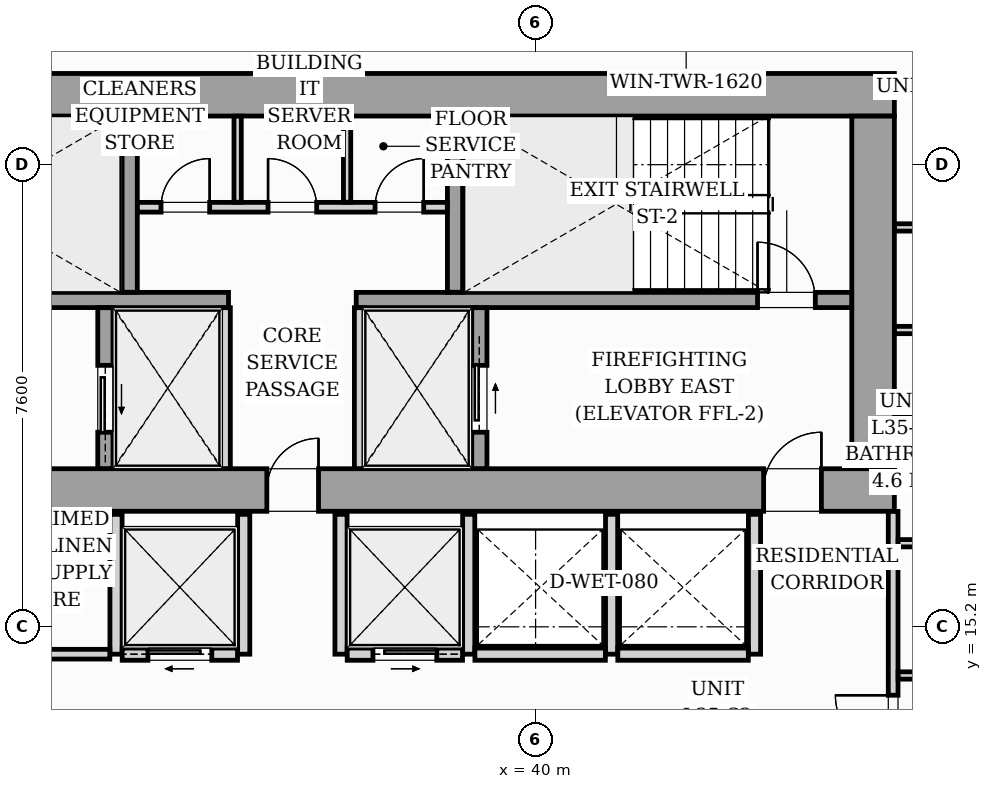
"""IFC4 building model, lengths in metres.
Left out: names, types, materials, properties, quantities, classifications, styles, units other than length and angle.
Written with IfcOpenShell. Run it as: python <this file> out.ifc"""

import sys

from ifc_helpers import new_model, si_unit, direction, frame, frame_2d, origin, origin_2d, place, context, subcontext, project, spatial, rectangle, i_section, extrude, source, transform, mapped, element, fill, save


model = new_model("IFC4")
c1 = context("Model", 3, precision=1e-05, world=origin(), true_north=direction((0.0, 1.0)))
c2 = subcontext(c1, "Body", "Model", "MODEL_VIEW")
j1 = project(units=[si_unit("LENGTHUNIT", "METRE"), si_unit("PLANEANGLEUNIT", "RADIAN")], contexts=[c1])
p1 = place(None, origin())
s1 = spatial("IfcSite", under=j1, at=p1, CompositionType="ELEMENT")
p2 = place(p1, origin())
s2 = spatial("IfcBuilding", under=s1, at=p2, CompositionType="ELEMENT")
p3 = place(p2, frame((0.0, 0.0, 124.6)))
s3 = spatial("IfcBuildingStorey", under=s2, at=p3, CompositionType="ELEMENT", Elevation=124.6)
m1 = source(origin(), c2, "Body", "SweptSolid", [
    extrude(i_section(OverallWidth=0.421, OverallDepth=0.465, WebThickness=0.045, FlangeThickness=0.073, FilletRadius=0.018, at=origin_2d()), origin(), (0.0, 0.0, 1.0), 3.196),
])
for number, where, z_axis, x_axis in (
    (1, (33.12, 17.4, 0.002), (0.0, 0.0, 1.0), (1.0, 0.0, 0.0)),
    (2, (38.88, 17.4, 0.002), (0.0, 0.0, 1.0), (1.0, 0.0, 0.0)),
    (3, (45.6, 17.4, 0.002), (0.0, 0.0, 1.0), (1.0, 0.0, 0.0)),
    (4, (33.12, 24.0, 0.002), (0.0, 0.0, 1.0), (1.0, 0.0, 0.0)),
    (5, (38.88, 24.0, 0.002), (0.0, 0.0, 1.0), (1.0, 0.0, 0.0)),
    (6, (45.6, 24.0, 0.002), (0.0, 0.0, 1.0), (1.0, 0.0, 0.0)),
):
    element("IfcColumn", number, at=place(p3, frame(where, z_axis=z_axis, x_axis=x_axis)), inside=s3, PredefinedType="PILASTER", context=c2, shape_type="MappedRepresentation", body=[
        mapped(m1, transform((0.0, 0.0, 0.0), scale=1.0)),
    ])
p4 = place(p3, frame((40.983, 25.727, 0.0), z_axis=(0.0, 0.0, 1.0), x_axis=(0.995395844771, -0.095849424686, 0.0)))
e7 = element("IfcWall", 7, at=p4, inside=s3, PredefinedType="STANDARD", context=c2, shape_type="SweptSolid", body=[
    extrude(rectangle(XDim=17.01, YDim=0.26, at=frame_2d((8.505, 0.0))), origin(), (0.0, 0.0, 1.0), 2.94),
])
p5 = place(p4, frame((11.06, 0.0, 0.0)))
e8 = element("IfcOpeningElement", 8, at=p5, cuts=e7, PredefinedType="OPENING", context=c2, shape_type="SweptSolid", body=[
    extrude(rectangle(XDim=1.8, YDim=2.06, at=frame_2d((0.9, 1.03))), frame((0.0, 0.14, 0.0), z_axis=(0.0, -1.0, 0.0), x_axis=(1.0, 0.0, 0.0)), (0.0, 0.0, 1.0), 0.28),
])
p6 = place(p4, frame((0.7, 0.0, 0.65)))
e9 = element("IfcOpeningElement", 9, at=p6, cuts=e7, PredefinedType="OPENING", context=c2, shape_type="SweptSolid", body=[
    extrude(rectangle(XDim=1.6, YDim=1.5, at=frame_2d((0.8, 0.75))), frame((0.0, 0.14, 0.0), z_axis=(0.0, -1.0, 0.0), x_axis=(1.0, 0.0, 0.0)), (0.0, 0.0, 1.0), 0.28),
])
p7 = place(p3, frame((26.1, 17.45, 0.0), z_axis=(0.0, 0.0, 1.0), x_axis=(1.0, 0.0, 0.0)))
e10 = element("IfcWall", 10, at=p7, inside=s3, PredefinedType="SHEAR", context=c2, shape_type="SweptSolid", body=[
    extrude(rectangle(XDim=19.8, YDim=0.7, at=frame_2d((9.9, 0.0))), origin(), (0.0, 0.0, 1.0), 3.2),
])
p8 = place(p7, frame((1.05, 0.0, 0.0)))
e11 = element("IfcOpeningElement", 11, at=p8, cuts=e10, PredefinedType="OPENING", context=c2, shape_type="SweptSolid", body=[
    extrude(rectangle(XDim=0.95, YDim=2.06, at=frame_2d((0.475, 1.03))), frame((0.0, 0.36, 0.0), z_axis=(0.0, -1.0, 0.0), x_axis=(1.0, 0.0, 0.0)), (0.0, 0.0, 1.0), 0.72),
])
p9 = place(p7, frame((9.48, 0.0, 0.0)))
e12 = element("IfcOpeningElement", 12, at=p9, cuts=e10, PredefinedType="OPENING", context=c2, shape_type="SweptSolid", body=[
    extrude(rectangle(XDim=0.85, YDim=2.0, at=frame_2d((0.425, 1.0))), frame((0.0, 0.36, 0.0), z_axis=(0.0, -1.0, 0.0), x_axis=(1.0, 0.0, 0.0)), (0.0, 0.0, 1.0), 0.72),
])
p10 = place(p7, frame((17.65, 0.0, 0.0)))
e13 = element("IfcOpeningElement", 13, at=p10, cuts=e10, PredefinedType="OPENING", context=c2, shape_type="SweptSolid", body=[
    extrude(rectangle(XDim=0.95, YDim=2.06, at=frame_2d((0.475, 1.03))), frame((0.0, 0.36, 0.0), z_axis=(0.0, -1.0, 0.0), x_axis=(1.0, 0.0, 0.0)), (0.0, 0.0, 1.0), 0.72),
])
p11 = place(p3, frame((26.1, 23.95, 0.0), z_axis=(0.0, 0.0, 1.0), x_axis=(1.0, 0.0, 0.0)))
e14 = element("IfcWall", 14, at=p11, inside=s3, PredefinedType="SHEAR", context=c2, shape_type="SweptSolid", body=[
    extrude(rectangle(XDim=19.8, YDim=0.7, at=frame_2d((9.9, 0.0))), origin(), (0.0, 0.0, 1.0), 3.2),
])
p12 = place(p3, frame((45.55, 17.802, 0.0), z_axis=(0.0, 0.0, 1.0), x_axis=(0.0, 1.0, 0.0)))
e15 = element("IfcWall", 15, at=p12, inside=s3, PredefinedType="SHEAR", context=c2, shape_type="SweptSolid", body=[
    extrude(rectangle(XDim=5.796, YDim=0.7, at=frame_2d((2.898, 0.0))), origin(), (0.0, 0.0, 1.0), 3.2),
])
p13 = place(p3, frame((26.802, 20.575, 0.0), z_axis=(0.0, 0.0, 1.0), x_axis=(1.0, 0.0, 0.0)))
e16 = element("IfcWall", 16, at=p13, inside=s3, PredefinedType="SOLIDWALL", context=c2, shape_type="SweptSolid", body=[
    extrude(rectangle(XDim=8.148, YDim=0.25, at=frame_2d((4.074, 0.0))), origin(), (0.0, 0.0, 1.0), 3.2),
])
p14 = place(p13, frame((0.348, 0.0, 0.0)))
e17 = element("IfcOpeningElement", 17, at=p14, cuts=e16, PredefinedType="OPENING", context=c2, shape_type="SweptSolid", body=[
    extrude(rectangle(XDim=0.95, YDim=2.06, at=frame_2d((0.475, 1.03))), frame((0.0, 0.135, 0.0), z_axis=(0.0, -1.0, 0.0), x_axis=(1.0, 0.0, 0.0)), (0.0, 0.0, 1.0), 0.27),
])
p15 = place(p3, frame((37.05, 20.575, 0.0), z_axis=(0.0, 0.0, 1.0), x_axis=(1.0, 0.0, 0.0)))
e18 = element("IfcWall", 18, at=p15, inside=s3, PredefinedType="SOLIDWALL", context=c2, shape_type="SweptSolid", body=[
    extrude(rectangle(XDim=8.148, YDim=0.25, at=frame_2d((4.074, 0.0))), origin(), (0.0, 0.0, 1.0), 3.2),
])
p16 = place(p15, frame((6.6, 0.0, 0.0)))
e19 = element("IfcOpeningElement", 19, at=p16, cuts=e18, PredefinedType="OPENING", context=c2, shape_type="SweptSolid", body=[
    extrude(rectangle(XDim=0.95, YDim=2.06, at=frame_2d((0.475, 1.03))), frame((0.0, 0.135, 0.0), z_axis=(0.0, -1.0, 0.0), x_axis=(1.0, 0.0, 0.0)), (0.0, 0.0, 1.0), 0.27),
])
for number, where, z_axis, x_axis in (
    (20, (33.325, 20.702, 0.0), (0.0, 0.0, 1.0), (0.0, 1.0, 0.0)),
    (21, (38.675, 20.702, 0.0), (0.0, 0.0, 1.0), (0.0, 1.0, 0.0)),
):
    element("IfcWall", number, at=place(p3, frame(where, z_axis=z_axis, x_axis=x_axis)), inside=s3, PredefinedType="SOLIDWALL", context=c2, shape_type="SweptSolid", body=[
        extrude(rectangle(XDim=2.896, YDim=0.25, at=frame_2d((1.448, 0.0))), origin(), (0.0, 0.0, 1.0), 3.2),
    ])
p17 = place(p3, frame((32.925, 17.802, 0.0), z_axis=(0.0, 0.0, 1.0), x_axis=(0.0, 1.0, 0.0)))
e22 = element("IfcWall", 22, at=p17, inside=s3, PredefinedType="SOLIDWALL", context=c2, shape_type="SweptSolid", body=[
    extrude(rectangle(XDim=2.646, YDim=0.25, at=frame_2d((1.323, 0.0))), origin(), (0.0, 0.0, 1.0), 3.2),
])
p18 = place(p17, frame((0.598, 0.0, 0.0)))
e23 = element("IfcOpeningElement", 23, at=p18, cuts=e22, PredefinedType="OPENING", context=c2, shape_type="SweptSolid", body=[
    extrude(rectangle(XDim=1.1, YDim=2.08, at=frame_2d((0.55, 1.04))), frame((0.0, 0.135, 0.0), z_axis=(0.0, -1.0, 0.0), x_axis=(1.0, 0.0, 0.0)), (0.0, 0.0, 1.0), 0.27),
])
for number, where, z_axis, x_axis in (
    (24, (34.9, 17.802, 0.0), (0.0, 0.0, 1.0), (0.0, 1.0, 0.0)),
    (25, (37.1, 17.802, 0.0), (0.0, 0.0, 1.0), (0.0, 1.0, 0.0)),
):
    element("IfcWall", number, at=place(p3, frame(where, z_axis=z_axis, x_axis=x_axis)), inside=s3, PredefinedType="PARTITIONING", context=c2, shape_type="SweptSolid", body=[
        extrude(rectangle(XDim=2.646, YDim=0.16, at=frame_2d((1.323, 0.0))), origin(), (0.0, 0.0, 1.0), 2.94),
    ])
p19 = place(p3, frame((39.075, 17.802, 0.0), z_axis=(0.0, 0.0, 1.0), x_axis=(0.0, 1.0, 0.0)))
e26 = element("IfcWall", 26, at=p19, inside=s3, PredefinedType="SOLIDWALL", context=c2, shape_type="SweptSolid", body=[
    extrude(rectangle(XDim=2.646, YDim=0.25, at=frame_2d((1.323, 0.0))), origin(), (0.0, 0.0, 1.0), 3.2),
])
p20 = place(p19, frame((0.598, 0.0, 0.0)))
e27 = element("IfcOpeningElement", 27, at=p20, cuts=e26, PredefinedType="OPENING", context=c2, shape_type="SweptSolid", body=[
    extrude(rectangle(XDim=1.1, YDim=2.08, at=frame_2d((0.55, 1.04))), frame((0.0, 0.135, 0.0), z_axis=(0.0, -1.0, 0.0), x_axis=(1.0, 0.0, 0.0)), (0.0, 0.0, 1.0), 0.27),
])
p21 = place(p3, frame((33.452, 22.1, 0.0), z_axis=(0.0, 0.0, 1.0), x_axis=(1.0, 0.0, 0.0)))
e28 = element("IfcWall", 28, at=p21, inside=s3, PredefinedType="PARTITIONING", context=c2, shape_type="SweptSolid", body=[
    extrude(rectangle(XDim=5.096, YDim=0.16, at=frame_2d((2.548, 0.0))), origin(), (0.0, 0.0, 1.0), 2.94),
])
p22 = place(p21, frame((0.388, 0.0, 0.0)))
e29 = element("IfcOpeningElement", 29, at=p22, cuts=e28, PredefinedType="OPENING", context=c2, shape_type="SweptSolid", body=[
    extrude(rectangle(XDim=0.8, YDim=2.05, at=frame_2d((0.4, 1.025))), frame((0.0, 0.09, 0.0), z_axis=(0.0, -1.0, 0.0), x_axis=(1.0, 0.0, 0.0)), (0.0, 0.0, 1.0), 0.18),
])
p23 = place(p21, frame((2.148, 0.0, 0.0)))
e30 = element("IfcOpeningElement", 30, at=p23, cuts=e28, PredefinedType="OPENING", context=c2, shape_type="SweptSolid", body=[
    extrude(rectangle(XDim=0.8, YDim=2.05, at=frame_2d((0.4, 1.025))), frame((0.0, 0.09, 0.0), z_axis=(0.0, -1.0, 0.0), x_axis=(1.0, 0.0, 0.0)), (0.0, 0.0, 1.0), 0.18),
])
p24 = place(p21, frame((3.908, 0.0, 0.0)))
e31 = element("IfcOpeningElement", 31, at=p24, cuts=e28, PredefinedType="OPENING", context=c2, shape_type="SweptSolid", body=[
    extrude(rectangle(XDim=0.8, YDim=2.05, at=frame_2d((0.4, 1.025))), frame((0.0, 0.09, 0.0), z_axis=(0.0, -1.0, 0.0), x_axis=(1.0, 0.0, 0.0)), (0.0, 0.0, 1.0), 0.18),
])
for number, where, z_axis, x_axis in (
    (32, (35.1, 22.182, 0.0), (0.0, 0.0, 1.0), (0.0, 1.0, 0.0)),
    (33, (36.9, 22.182, 0.0), (0.0, 0.0, 1.0), (0.0, 1.0, 0.0)),
):
    element("IfcWall", number, at=place(p3, frame(where, z_axis=z_axis, x_axis=x_axis)), inside=s3, PredefinedType="PARTITIONING", context=c2, shape_type="SweptSolid", body=[
        extrude(rectangle(XDim=1.416, YDim=0.12, at=frame_2d((0.708, 0.0))), origin(), (0.0, 0.0, 1.0), 2.94),
    ])
p25 = place(p3, frame((33.1, 14.75, 0.0), z_axis=(0.0, 0.0, 1.0), x_axis=(0.0, 1.0, 0.0)))
e34 = element("IfcWall", 34, at=p25, inside=s3, PredefinedType="PARTITIONING", context=c2, shape_type="SweptSolid", body=[
    extrude(rectangle(XDim=2.3, YDim=0.2, at=frame_2d((1.15, 0.0))), origin(), (0.0, 0.0, 1.0), 2.94),
])
p26 = place(p3, frame((28.482, 14.75, 0.0), z_axis=(0.0, 0.0, 1.0), x_axis=(1.0, 0.0, 0.0)))
e35 = element("IfcWall", 35, at=p26, inside=s3, PredefinedType="PARTITIONING", context=c2, shape_type="SweptSolid", body=[
    extrude(rectangle(XDim=4.516, YDim=0.16, at=frame_2d((2.258, 0.0))), origin(), (0.0, 0.0, 1.0), 2.94),
])
p27 = place(p26, frame((1.868, 0.0, 0.0)))
e36 = element("IfcOpeningElement", 36, at=p27, cuts=e35, PredefinedType="OPENING", context=c2, shape_type="SweptSolid", body=[
    extrude(rectangle(XDim=0.8, YDim=2.05, at=frame_2d((0.4, 1.025))), frame((0.0, 0.09, 0.0), z_axis=(0.0, -1.0, 0.0), x_axis=(1.0, 0.0, 0.0)), (0.0, 0.0, 1.0), 0.18),
])
p28 = place(p3, frame((35.2, 14.75, 0.0), z_axis=(0.0, 0.0, 1.0), x_axis=(0.0, 1.0, 0.0)))
e37 = element("IfcWall", 37, at=p28, inside=s3, PredefinedType="PARTITIONING", context=c2, shape_type="SweptSolid", body=[
    extrude(rectangle(XDim=2.3, YDim=0.2, at=frame_2d((1.15, 0.0))), origin(), (0.0, 0.0, 1.0), 2.94),
])
p29 = place(p3, frame((33.202, 14.75, 0.0), z_axis=(0.0, 0.0, 1.0), x_axis=(1.0, 0.0, 0.0)))
e38 = element("IfcWall", 38, at=p29, inside=s3, PredefinedType="PARTITIONING", context=c2, shape_type="SweptSolid", body=[
    extrude(rectangle(XDim=1.896, YDim=0.2, at=frame_2d((0.948, 0.0))), origin(), (0.0, 0.0, 1.0), 2.94),
])
p30 = place(p29, frame((0.423, 0.0, 0.0)))
e39 = element("IfcOpeningElement", 39, at=p30, cuts=e38, PredefinedType="OPENING", context=c2, shape_type="SweptSolid", body=[
    extrude(rectangle(XDim=1.05, YDim=2.08, at=frame_2d((0.525, 1.04))), frame((0.0, 0.11, 0.0), z_axis=(0.0, -1.0, 0.0), x_axis=(1.0, 0.0, 0.0)), (0.0, 0.0, 1.0), 0.22),
])
for number, where, z_axis, x_axis in (
    (40, (36.8, 14.75, 0.0), (0.0, 0.0, 1.0), (0.0, 1.0, 0.0)),
    (41, (38.9, 14.75, 0.0), (0.0, 0.0, 1.0), (0.0, 1.0, 0.0)),
):
    element("IfcWall", number, at=place(p3, frame(where, z_axis=z_axis, x_axis=x_axis)), inside=s3, PredefinedType="PARTITIONING", context=c2, shape_type="SweptSolid", body=[
        extrude(rectangle(XDim=2.3, YDim=0.2, at=frame_2d((1.15, 0.0))), origin(), (0.0, 0.0, 1.0), 2.94),
    ])
p31 = place(p3, frame((36.902, 14.75, 0.0), z_axis=(0.0, 0.0, 1.0), x_axis=(1.0, 0.0, 0.0)))
e42 = element("IfcWall", 42, at=p31, inside=s3, PredefinedType="PARTITIONING", context=c2, shape_type="SweptSolid", body=[
    extrude(rectangle(XDim=1.896, YDim=0.2, at=frame_2d((0.948, 0.0))), origin(), (0.0, 0.0, 1.0), 2.94),
])
p32 = place(p31, frame((0.423, 0.0, 0.0)))
e43 = element("IfcOpeningElement", 43, at=p32, cuts=e42, PredefinedType="OPENING", context=c2, shape_type="SweptSolid", body=[
    extrude(rectangle(XDim=1.05, YDim=2.08, at=frame_2d((0.525, 1.04))), frame((0.0, 0.11, 0.0), z_axis=(0.0, -1.0, 0.0), x_axis=(1.0, 0.0, 0.0)), (0.0, 0.0, 1.0), 0.22),
])
for number, where, z_axis, x_axis in (
    (44, (41.25, 14.75, 0.0), (0.0, 0.0, 1.0), (0.0, 1.0, 0.0)),
    (45, (43.6, 14.75, 0.0), (0.0, 0.0, 1.0), (0.0, 1.0, 0.0)),
):
    element("IfcWall", number, at=place(p3, frame(where, z_axis=z_axis, x_axis=x_axis)), inside=s3, PredefinedType="PARTITIONING", context=c2, shape_type="SweptSolid", body=[
        extrude(rectangle(XDim=2.3, YDim=0.2, at=frame_2d((1.15, 0.0))), origin(), (0.0, 0.0, 1.0), 2.94),
    ])
for number, where, z_axis, x_axis in (
    (46, (39.002, 14.75, 0.0), (0.0, 0.0, 1.0), (1.0, 0.0, 0.0)),
    (47, (41.352, 14.75, 0.0), (0.0, 0.0, 1.0), (1.0, 0.0, 0.0)),
):
    element("IfcWall", number, at=place(p3, frame(where, z_axis=z_axis, x_axis=x_axis)), inside=s3, PredefinedType="PARTITIONING", context=c2, shape_type="SweptSolid", body=[
        extrude(rectangle(XDim=2.146, YDim=0.2, at=frame_2d((1.073, 0.0))), origin(), (0.0, 0.0, 1.0), 2.94),
    ])
p33 = place(p3, frame((45.88, 12.632, 0.0), z_axis=(0.0, 0.0, 1.0), x_axis=(0.0, 1.0, 0.0)))
e48 = element("IfcWall", 48, at=p33, inside=s3, PredefinedType="PARTITIONING", context=c2, shape_type="SweptSolid", body=[
    extrude(rectangle(XDim=4.466, YDim=0.16, at=frame_2d((2.233, 0.0))), origin(), (0.0, 0.0, 1.0), 2.94),
])
p34 = place(p33, frame((0.493, 0.0, 0.0)))
e49 = element("IfcOpeningElement", 49, at=p34, cuts=e48, PredefinedType="OPENING", context=c2, shape_type="SweptSolid", body=[
    extrude(rectangle(XDim=0.95, YDim=2.06, at=frame_2d((0.475, 1.03))), frame((0.0, 0.09, 0.0), z_axis=(0.0, -1.0, 0.0), x_axis=(1.0, 0.0, 0.0)), (0.0, 0.0, 1.0), 0.18),
])
for number, where, z_axis, x_axis in (
    (50, (45.962, 16.575, 0.0), (0.0, 0.0, 1.0), (1.0, 0.0, 0.0)),
    (51, (45.962, 14.4, 0.0), (0.0, 0.0, 1.0), (1.0, 0.0, 0.0)),
):
    element("IfcWall", number, at=place(p3, frame(where, z_axis=z_axis, x_axis=x_axis)), inside=s3, PredefinedType="PARTITIONING", context=c2, shape_type="SweptSolid", body=[
        extrude(rectangle(XDim=2.256, YDim=0.12, at=frame_2d((1.128, 0.0))), origin(), (0.0, 0.0, 1.0), 2.94),
    ])
p35 = place(p3, frame((45.902, 18.75, 0.0), z_axis=(0.0, 0.0, 1.0), x_axis=(1.0, 0.0, 0.0)))
e52 = element("IfcWall", 52, at=p35, inside=s3, PredefinedType="PARTITIONING", context=c2, shape_type="SweptSolid", body=[
    extrude(rectangle(XDim=2.316, YDim=0.12, at=frame_2d((1.158, 0.0))), origin(), (0.0, 0.0, 1.0), 2.94),
])
p36 = place(p3, frame((45.902, 21.768, 0.0), z_axis=(0.0, 0.0, 1.0), x_axis=(1.0, 0.0, 0.0)))
e53 = element("IfcWall", 53, at=p36, inside=s3, PredefinedType="PARTITIONING", context=c2, shape_type="SweptSolid", body=[
    extrude(rectangle(XDim=12.781, YDim=0.12, at=frame_2d((6.391, 0.0))), origin(), (0.0, 0.0, 1.0), 2.94),
])
p37 = place(p36, frame((6.146, 0.0, 0.0)))
e54 = element("IfcOpeningElement", 54, at=p37, cuts=e53, PredefinedType="OPENING", context=c2, shape_type="SweptSolid", body=[
    extrude(rectangle(XDim=0.85, YDim=2.05, at=frame_2d((0.425, 1.025))), frame((0.0, 0.07, 0.0), z_axis=(0.0, -1.0, 0.0), x_axis=(1.0, 0.0, 0.0)), (0.0, 0.0, 1.0), 0.14),
])
p38 = place(p3, frame((45.902, 20.081, 0.0), z_axis=(0.0, 0.0, 1.0), x_axis=(1.0, 0.0, 0.0)))
e55 = element("IfcWall", 55, at=p38, inside=s3, PredefinedType="PARTITIONING", context=c2, shape_type="SweptSolid", body=[
    extrude(rectangle(XDim=14.057, YDim=0.12, at=frame_2d((7.029, 0.0))), origin(), (0.0, 0.0, 1.0), 2.94),
])
p39 = place(p38, frame((6.708, 0.0, 0.0)))
e56 = element("IfcOpeningElement", 56, at=p39, cuts=e55, PredefinedType="OPENING", context=c2, shape_type="SweptSolid", body=[
    extrude(rectangle(XDim=0.85, YDim=2.05, at=frame_2d((0.425, 1.025))), frame((0.0, 0.07, 0.0), z_axis=(0.0, -1.0, 0.0), x_axis=(1.0, 0.0, 0.0)), (0.0, 0.0, 1.0), 0.14),
])
m2 = source(origin(), c2, "Body", "SweptSolid", [
    extrude(rectangle(XDim=0.85, YDim=2.0, at=frame_2d((0.425, 1.0))), frame((0.0, 0.025, 0.0), z_axis=(0.0, -1.0, 0.0), x_axis=(1.0, 0.0, 0.0)), (0.0, 0.0, 1.0), 0.05),
])
p40 = place(p9, origin())
e57 = element("IfcDoor", 57, at=p40, inside=s3, OperationType="SINGLE_SWING_RIGHT", PredefinedType="DOOR", context=c2, shape_type="MappedRepresentation", body=[
    mapped(m2, transform((0.0, 0.0, 0.0), scale=1.0)),
])
fill(e12, e57)
m3 = source(origin(), c2, "Body", "SweptSolid", [
    extrude(rectangle(XDim=0.95, YDim=2.06, at=frame_2d((0.475, 1.03))), frame((0.0, 0.025, 0.0), z_axis=(0.0, -1.0, 0.0), x_axis=(1.0, 0.0, 0.0)), (0.0, 0.0, 1.0), 0.05),
])
p41 = place(p10, origin())
e58 = element("IfcDoor", 58, at=p41, inside=s3, OperationType="SINGLE_SWING_RIGHT", PredefinedType="DOOR", context=c2, shape_type="MappedRepresentation", body=[
    mapped(m3, transform((0.0, 0.0, 0.0), scale=1.0)),
])
fill(e13, e58)
p42 = place(p16, origin())
e59 = element("IfcDoor", 59, at=p42, inside=s3, OperationType="SINGLE_SWING_LEFT", PredefinedType="DOOR", context=c2, shape_type="MappedRepresentation", body=[
    mapped(m3, transform((0.0, 0.0, 0.0), scale=1.0)),
])
fill(e19, e59)
m4 = source(origin(), c2, "Body", "SweptSolid", [
    extrude(rectangle(XDim=1.1, YDim=2.08, at=frame_2d((0.55, 1.04))), frame((0.0, 0.025, 0.0), z_axis=(0.0, -1.0, 0.0), x_axis=(1.0, 0.0, 0.0)), (0.0, 0.0, 1.0), 0.05),
])
p43 = place(p18, origin())
e60 = element("IfcDoor", 60, at=p43, inside=s3, OperationType="SLIDING_TO_LEFT", PredefinedType="DOOR", context=c2, shape_type="MappedRepresentation", body=[
    mapped(m4, transform((0.0, 0.0, 0.0), scale=1.0)),
])
fill(e23, e60)
p44 = place(p20, origin())
e61 = element("IfcDoor", 61, at=p44, inside=s3, OperationType="SLIDING_TO_RIGHT", PredefinedType="DOOR", context=c2, shape_type="MappedRepresentation", body=[
    mapped(m4, transform((0.0, 0.0, 0.0), scale=1.0)),
])
fill(e27, e61)
m5 = source(origin(), c2, "Body", "SweptSolid", [
    extrude(rectangle(XDim=0.8, YDim=2.05, at=frame_2d((0.4, 1.025))), frame((0.0, 0.025, 0.0), z_axis=(0.0, -1.0, 0.0), x_axis=(1.0, 0.0, 0.0)), (0.0, 0.0, 1.0), 0.05),
])
p45 = place(p22, origin())
e62 = element("IfcDoor", 62, at=p45, inside=s3, OperationType="SINGLE_SWING_RIGHT", PredefinedType="DOOR", context=c2, shape_type="MappedRepresentation", body=[
    mapped(m5, transform((0.0, 0.0, 0.0), scale=1.0)),
])
fill(e29, e62)
p46 = place(p23, origin())
e63 = element("IfcDoor", 63, at=p46, inside=s3, OperationType="SINGLE_SWING_LEFT", PredefinedType="DOOR", context=c2, shape_type="MappedRepresentation", body=[
    mapped(m5, transform((0.0, 0.0, 0.0), scale=1.0)),
])
fill(e30, e63)
p47 = place(p24, origin())
e64 = element("IfcDoor", 64, at=p47, inside=s3, OperationType="SINGLE_SWING_RIGHT", PredefinedType="DOOR", context=c2, shape_type="MappedRepresentation", body=[
    mapped(m5, transform((0.0, 0.0, 0.0), scale=1.0)),
])
fill(e31, e64)
m6 = source(origin(), c2, "Body", "SweptSolid", [
    extrude(rectangle(XDim=1.05, YDim=2.08, at=frame_2d((0.525, 1.04))), frame((0.0, 0.025, 0.0), z_axis=(0.0, -1.0, 0.0), x_axis=(1.0, 0.0, 0.0)), (0.0, 0.0, 1.0), 0.05),
])
p48 = place(p30, origin())
e65 = element("IfcDoor", 65, at=p48, inside=s3, OperationType="SLIDING_TO_LEFT", PredefinedType="DOOR", context=c2, shape_type="MappedRepresentation", body=[
    mapped(m6, transform((0.0, 0.0, 0.0), scale=1.0)),
])
fill(e39, e65)
p49 = place(p32, origin())
e66 = element("IfcDoor", 66, at=p49, inside=s3, OperationType="SLIDING_TO_RIGHT", PredefinedType="DOOR", context=c2, shape_type="MappedRepresentation", body=[
    mapped(m6, transform((0.0, 0.0, 0.0), scale=1.0)),
])
fill(e43, e66)
m7 = source(origin(), c2, "Body", "SweptSolid", [
    extrude(rectangle(XDim=0.95, YDim=2.06, at=frame_2d((0.475, 1.03))), frame((0.0, 0.025, 0.0), z_axis=(0.0, -1.0, 0.0), x_axis=(1.0, 0.0, 0.0)), (0.0, 0.0, 1.0), 0.05),
])
p50 = place(p34, origin())
e67 = element("IfcDoor", 67, at=p50, inside=s3, OperationType="SINGLE_SWING_RIGHT", PredefinedType="DOOR", context=c2, shape_type="MappedRepresentation", body=[
    mapped(m7, transform((0.0, 0.0, 0.0), scale=1.0)),
])
fill(e49, e67)
save(model, sys.argv[1])
